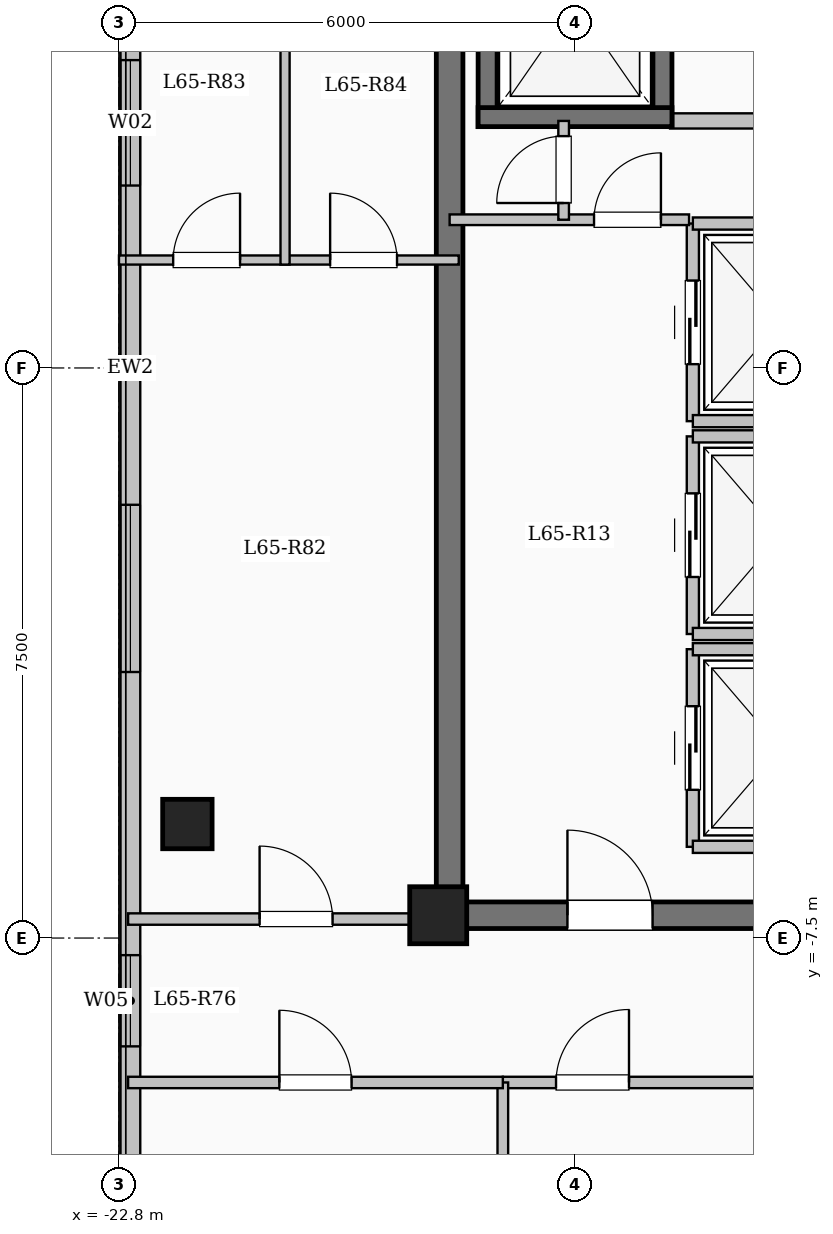
"""IFC4 building model, lengths in metres.
Left out: names, types, materials, properties, quantities, classifications, styles, units other than length and angle.
Written with IfcOpenShell. Run it as: python <this file> out.ifc"""

import sys

from ifc_helpers import new_model, si_unit, direction, frame, frame_2d, origin, origin_2d, place, context, subcontext, project, spatial, rectangle, extrude, element, fill, save


model = new_model("IFC4")
c1 = context("Model", 3, precision=1e-05, world=origin(), true_north=direction((0.0, 1.0)))
c2 = subcontext(c1, "Body", "Model", "MODEL_VIEW")
j1 = project(units=[si_unit("LENGTHUNIT", "METRE"), si_unit("PLANEANGLEUNIT", "RADIAN")], contexts=[c1])
p1 = place(None, origin())
s1 = spatial("IfcSite", under=j1, at=p1, CompositionType="ELEMENT")
p2 = place(p1, origin())
s2 = spatial("IfcBuilding", under=s1, at=p2, CompositionType="ELEMENT")
p3 = place(p2, frame((0.0, 0.0, 241.5)))
s3 = spatial("IfcBuildingStorey", under=s2, at=p3, CompositionType="ELEMENT", Elevation=241.5)
p4 = place(p3, frame((-18.6, -7.2, 0.0), z_axis=(0.0, 0.0, 1.0), x_axis=(1.0, 0.0, 0.0)))
e1 = element("IfcColumn", 1, at=p4, inside=s3, PredefinedType="COLUMN", context=c2, shape_type="SweptSolid", body=[
    extrude(rectangle(XDim=0.75, YDim=0.75, at=origin_2d()), origin(), (0.0, 0.0, 1.0), 3.35),
])
p5 = place(p3, frame((-21.9, -6.0, 0.0), z_axis=(0.0, 0.0, 1.0), x_axis=(1.0, 0.0, 0.0)))
e2 = element("IfcColumn", 2, at=p5, inside=s3, PredefinedType="COLUMN", context=c2, shape_type="SweptSolid", body=[
    extrude(rectangle(XDim=0.65, YDim=0.65, at=origin_2d()), origin(), (0.0, 0.0, 1.0), 3.35),
])
p6 = place(p3, frame((-22.65, -17.55, 0.0), z_axis=(0.0, 0.0, 1.0), x_axis=(0.0, 1.0, 0.0)))
e3 = element("IfcWall", 3, at=p6, inside=s3, PredefinedType="SOLIDWALL", context=c2, shape_type="SweptSolid", body=[
    extrude(rectangle(XDim=35.1, YDim=0.26, at=frame_2d((17.55, 0.0))), origin(), (0.0, 0.0, 1.0), 3.1),
])
p7 = place(p6, frame((2.975, 0.0, 0.9)))
e4 = element("IfcOpeningElement", 4, at=p7, cuts=e3, PredefinedType="OPENING", context=c2, shape_type="SweptSolid", body=[
    extrude(rectangle(XDim=2.2, YDim=1.75, at=frame_2d((1.1, 0.875))), frame((0.0, 0.14, 0.0), z_axis=(0.0, -1.0, 0.0), x_axis=(1.0, 0.0, 0.0)), (0.0, 0.0, 1.0), 0.28),
])
p8 = place(p6, frame((8.625, 0.0, 0.95)))
e5 = element("IfcOpeningElement", 5, at=p8, cuts=e3, PredefinedType="OPENING", context=c2, shape_type="SweptSolid", body=[
    extrude(rectangle(XDim=1.2, YDim=1.5, at=frame_2d((0.6, 0.75))), frame((0.0, 0.14, 0.0), z_axis=(0.0, -1.0, 0.0), x_axis=(1.0, 0.0, 0.0)), (0.0, 0.0, 1.0), 0.28),
])
p9 = place(p6, frame((13.55, 0.0, 0.9)))
e6 = element("IfcOpeningElement", 6, at=p9, cuts=e3, PredefinedType="OPENING", context=c2, shape_type="SweptSolid", body=[
    extrude(rectangle(XDim=2.2, YDim=1.75, at=frame_2d((1.1, 0.875))), frame((0.0, 0.14, 0.0), z_axis=(0.0, -1.0, 0.0), x_axis=(1.0, 0.0, 0.0)), (0.0, 0.0, 1.0), 0.28),
])
p10 = place(p6, frame((19.95, 0.0, 0.9)))
e7 = element("IfcOpeningElement", 7, at=p10, cuts=e3, PredefinedType="OPENING", context=c2, shape_type="SweptSolid", body=[
    extrude(rectangle(XDim=1.65, YDim=1.6, at=frame_2d((0.825, 0.8))), frame((0.0, 0.14, 0.0), z_axis=(0.0, -1.0, 0.0), x_axis=(1.0, 0.0, 0.0)), (0.0, 0.0, 1.0), 0.28),
])
p11 = place(p6, frame((24.425, 0.0, 0.9)))
e8 = element("IfcOpeningElement", 8, at=p11, cuts=e3, PredefinedType="OPENING", context=c2, shape_type="SweptSolid", body=[
    extrude(rectangle(XDim=2.0, YDim=1.7, at=frame_2d((1.0, 0.85))), frame((0.0, 0.14, 0.0), z_axis=(0.0, -1.0, 0.0), x_axis=(1.0, 0.0, 0.0)), (0.0, 0.0, 1.0), 0.28),
])
p12 = place(p6, frame((28.675, 0.0, 0.95)))
e9 = element("IfcOpeningElement", 9, at=p12, cuts=e3, PredefinedType="OPENING", context=c2, shape_type="SweptSolid", body=[
    extrude(rectangle(XDim=1.0, YDim=1.5, at=frame_2d((0.5, 0.75))), frame((0.0, 0.14, 0.0), z_axis=(0.0, -1.0, 0.0), x_axis=(1.0, 0.0, 0.0)), (0.0, 0.0, 1.0), 0.28),
])
p13 = place(p6, frame((31.6, 0.0, 0.9)))
e10 = element("IfcOpeningElement", 10, at=p13, cuts=e3, PredefinedType="OPENING", context=c2, shape_type="SweptSolid", body=[
    extrude(rectangle(XDim=2.0, YDim=1.7, at=frame_2d((1.0, 0.85))), frame((0.0, 0.14, 0.0), z_axis=(0.0, -1.0, 0.0), x_axis=(1.0, 0.0, 0.0)), (0.0, 0.0, 1.0), 0.28),
])
p14 = place(p3, frame((-15.55, 3.25, 0.0), z_axis=(0.0, 0.0, 1.0), x_axis=(1.0, 0.0, 0.0)))
e11 = element("IfcWall", 11, at=p14, inside=s3, PredefinedType="SOLIDWALL", context=c2, shape_type="SweptSolid", body=[
    extrude(rectangle(XDim=5.4, YDim=0.2, at=frame_2d((2.7, 0.0))), origin(), (0.0, 0.0, 1.0), 3.1),
])
p15 = place(p3, frame((-17.95, 3.175, 0.0), z_axis=(0.0, 0.0, 1.0), x_axis=(0.0, 1.0, 0.0)))
e12 = element("IfcWall", 12, at=p15, inside=s3, PredefinedType="SHEAR", context=c2, shape_type="SweptSolid", body=[
    extrude(rectangle(XDim=3.25, YDim=0.25, at=frame_2d((1.625, 0.0))), origin(), (0.0, 0.0, 1.0), 3.35),
])
p16 = place(p3, frame((-15.65, 3.175, 0.0), z_axis=(0.0, 0.0, 1.0), x_axis=(0.0, 1.0, 0.0)))
e13 = element("IfcWall", 13, at=p16, inside=s3, PredefinedType="SHEAR", context=c2, shape_type="SweptSolid", body=[
    extrude(rectangle(XDim=3.25, YDim=0.25, at=frame_2d((1.625, 0.0))), origin(), (0.0, 0.0, 1.0), 3.35),
])
p17 = place(p16, frame((1.075, 0.0, 0.0)))
e14 = element("IfcOpeningElement", 14, at=p17, cuts=e13, PredefinedType="OPENING", context=c2, shape_type="SweptSolid", body=[
    extrude(rectangle(XDim=1.1, YDim=2.15, at=frame_2d((0.55, 1.075))), frame((0.0, 0.135, 0.0), z_axis=(0.0, -1.0, 0.0), x_axis=(1.0, 0.0, 0.0)), (0.0, 0.0, 1.0), 0.27),
])
p18 = place(p3, frame((-18.075, 3.3, 0.0), z_axis=(0.0, 0.0, 1.0), x_axis=(1.0, 0.0, 0.0)))
e15 = element("IfcWall", 15, at=p18, inside=s3, PredefinedType="SHEAR", context=c2, shape_type="SweptSolid", body=[
    extrude(rectangle(XDim=2.55, YDim=0.25, at=frame_2d((1.275, 0.0))), origin(), (0.0, 0.0, 1.0), 3.35),
])
p19 = place(p3, frame((-15.25, -6.3, 0.0), z_axis=(0.0, 0.0, 1.0), x_axis=(0.0, 1.0, 0.0)))
e16 = element("IfcWall", 16, at=p19, inside=s3, PredefinedType="SOLIDWALL", context=c2, shape_type="SweptSolid", body=[
    extrude(rectangle(XDim=2.6, YDim=0.16, at=frame_2d((1.3, 0.0))), origin(), (0.0, 0.0, 1.0), 3.1),
])
p20 = place(p19, frame((0.75, 0.0, 0.0)))
e17 = element("IfcOpeningElement", 17, at=p20, cuts=e16, PredefinedType="OPENING", context=c2, shape_type="SweptSolid", body=[
    extrude(rectangle(XDim=1.1, YDim=2.15, at=frame_2d((0.55, 1.075))), frame((0.0, 0.09, 0.0), z_axis=(0.0, -1.0, 0.0), x_axis=(1.0, 0.0, 0.0)), (0.0, 0.0, 1.0), 0.18),
])
for number, where, z_axis, x_axis in (
    (18, (-15.25, -6.3, 0.0), (0.0, 0.0, 1.0), (1.0, 0.0, 0.0)),
    (19, (-15.25, -3.7, 0.0), (0.0, 0.0, 1.0), (1.0, 0.0, 0.0)),
):
    element("IfcWall", number, at=place(p3, frame(where, z_axis=z_axis, x_axis=x_axis)), inside=s3, PredefinedType="SOLIDWALL", context=c2, shape_type="SweptSolid", body=[
        extrude(rectangle(XDim=2.3, YDim=0.16, at=frame_2d((1.15, 0.0))), origin(), (0.0, 0.0, 1.0), 3.1),
    ])
p21 = place(p3, frame((-15.25, -3.5, 0.0), z_axis=(0.0, 0.0, 1.0), x_axis=(0.0, 1.0, 0.0)))
e20 = element("IfcWall", 20, at=p21, inside=s3, PredefinedType="SOLIDWALL", context=c2, shape_type="SweptSolid", body=[
    extrude(rectangle(XDim=2.6, YDim=0.16, at=frame_2d((1.3, 0.0))), origin(), (0.0, 0.0, 1.0), 3.1),
])
p22 = place(p21, frame((0.75, 0.0, 0.0)))
e21 = element("IfcOpeningElement", 21, at=p22, cuts=e20, PredefinedType="OPENING", context=c2, shape_type="SweptSolid", body=[
    extrude(rectangle(XDim=1.1, YDim=2.15, at=frame_2d((0.55, 1.075))), frame((0.0, 0.09, 0.0), z_axis=(0.0, -1.0, 0.0), x_axis=(1.0, 0.0, 0.0)), (0.0, 0.0, 1.0), 0.18),
])
for number, where, z_axis, x_axis in (
    (22, (-15.25, -3.5, 0.0), (0.0, 0.0, 1.0), (1.0, 0.0, 0.0)),
    (23, (-15.25, -0.9, 0.0), (0.0, 0.0, 1.0), (1.0, 0.0, 0.0)),
):
    element("IfcWall", number, at=place(p3, frame(where, z_axis=z_axis, x_axis=x_axis)), inside=s3, PredefinedType="SOLIDWALL", context=c2, shape_type="SweptSolid", body=[
        extrude(rectangle(XDim=2.3, YDim=0.16, at=frame_2d((1.15, 0.0))), origin(), (0.0, 0.0, 1.0), 3.1),
    ])
p23 = place(p3, frame((-15.25, -0.7, 0.0), z_axis=(0.0, 0.0, 1.0), x_axis=(0.0, 1.0, 0.0)))
e24 = element("IfcWall", 24, at=p23, inside=s3, PredefinedType="SOLIDWALL", context=c2, shape_type="SweptSolid", body=[
    extrude(rectangle(XDim=2.6, YDim=0.16, at=frame_2d((1.3, 0.0))), origin(), (0.0, 0.0, 1.0), 3.1),
])
p24 = place(p23, frame((0.75, 0.0, 0.0)))
e25 = element("IfcOpeningElement", 25, at=p24, cuts=e24, PredefinedType="OPENING", context=c2, shape_type="SweptSolid", body=[
    extrude(rectangle(XDim=1.1, YDim=2.15, at=frame_2d((0.55, 1.075))), frame((0.0, 0.09, 0.0), z_axis=(0.0, -1.0, 0.0), x_axis=(1.0, 0.0, 0.0)), (0.0, 0.0, 1.0), 0.18),
])
for number, where, z_axis, x_axis in (
    (26, (-15.25, -0.7, 0.0), (0.0, 0.0, 1.0), (1.0, 0.0, 0.0)),
    (27, (-15.25, 1.9, 0.0), (0.0, 0.0, 1.0), (1.0, 0.0, 0.0)),
):
    element("IfcWall", number, at=place(p3, frame(where, z_axis=z_axis, x_axis=x_axis)), inside=s3, PredefinedType="SOLIDWALL", context=c2, shape_type="SweptSolid", body=[
        extrude(rectangle(XDim=2.3, YDim=0.16, at=frame_2d((1.15, 0.0))), origin(), (0.0, 0.0, 1.0), 3.1),
    ])
p25 = place(p3, frame((-18.45, -7.375, 0.0), z_axis=(0.0, 0.0, 1.0), x_axis=(0.0, 1.0, 0.0)))
e28 = element("IfcWall", 28, at=p25, inside=s3, PredefinedType="SHEAR", context=c2, shape_type="SweptSolid", body=[
    extrude(rectangle(XDim=14.05, YDim=0.35, at=frame_2d((7.025, 0.0))), origin(), (0.0, 0.0, 1.0), 3.35),
])
p26 = place(p3, frame((-18.625, -7.2, 0.0), z_axis=(0.0, 0.0, 1.0), x_axis=(1.0, 0.0, 0.0)))
e29 = element("IfcWall", 29, at=p26, inside=s3, PredefinedType="SHEAR", context=c2, shape_type="SweptSolid", body=[
    extrude(rectangle(XDim=8.55, YDim=0.35, at=frame_2d((4.275, 0.0))), origin(), (0.0, 0.0, 1.0), 3.35),
])
p27 = place(p26, frame((1.725, 0.0, 0.0)))
e30 = element("IfcOpeningElement", 30, at=p27, cuts=e29, PredefinedType="OPENING", context=c2, shape_type="SweptSolid", body=[
    extrude(rectangle(XDim=1.12, YDim=2.15, at=frame_2d((0.56, 1.075))), frame((0.0, 0.185, 0.0), z_axis=(0.0, -1.0, 0.0), x_axis=(1.0, 0.0, 0.0)), (0.0, 0.0, 1.0), 0.37),
])
p28 = place(p3, frame((-18.45, 1.95, 0.0), z_axis=(0.0, 0.0, 1.0), x_axis=(1.0, 0.0, 0.0)))
e31 = element("IfcWall", 31, at=p28, inside=s3, PredefinedType="PARTITIONING", context=c2, shape_type="SweptSolid", body=[
    extrude(rectangle(XDim=3.15, YDim=0.14, at=frame_2d((1.575, 0.0))), origin(), (0.0, 0.0, 1.0), 3.1),
])
p29 = place(p28, frame((1.9, 0.0, 0.0)))
e32 = element("IfcOpeningElement", 32, at=p29, cuts=e31, PredefinedType="OPENING", context=c2, shape_type="SweptSolid", body=[
    extrude(rectangle(XDim=0.88, YDim=2.1, at=frame_2d((0.44, 1.05))), frame((0.0, 0.08, 0.0), z_axis=(0.0, -1.0, 0.0), x_axis=(1.0, 0.0, 0.0)), (0.0, 0.0, 1.0), 0.16),
])
p30 = place(p3, frame((-16.95, 1.95, 0.0), z_axis=(0.0, 0.0, 1.0), x_axis=(0.0, 1.0, 0.0)))
e33 = element("IfcWall", 33, at=p30, inside=s3, PredefinedType="PARTITIONING", context=c2, shape_type="SweptSolid", body=[
    extrude(rectangle(XDim=1.3, YDim=0.14, at=frame_2d((0.65, 0.0))), origin(), (0.0, 0.0, 1.0), 3.1),
])
p31 = place(p30, frame((0.22, 0.0, 0.0)))
e34 = element("IfcOpeningElement", 34, at=p31, cuts=e33, PredefinedType="OPENING", context=c2, shape_type="SweptSolid", body=[
    extrude(rectangle(XDim=0.88, YDim=2.1, at=frame_2d((0.44, 1.05))), frame((0.0, 0.08, 0.0), z_axis=(0.0, -1.0, 0.0), x_axis=(1.0, 0.0, 0.0)), (0.0, 0.0, 1.0), 0.16),
])
p32 = place(p3, frame((-17.75, -9.4, 0.0), z_axis=(0.0, 0.0, 1.0), x_axis=(1.0, 0.0, 0.0)))
e35 = element("IfcWall", 35, at=p32, inside=s3, PredefinedType="PARTITIONING", context=c2, shape_type="SweptSolid", body=[
    extrude(rectangle(XDim=9.2, YDim=0.15, at=frame_2d((4.6, 0.0))), origin(), (0.0, 0.0, 1.0), 3.1),
])
p33 = place(p32, frame((0.7, 0.0, 0.0)))
e36 = element("IfcOpeningElement", 36, at=p33, cuts=e35, PredefinedType="OPENING", context=c2, shape_type="SweptSolid", body=[
    extrude(rectangle(XDim=0.96, YDim=2.15, at=frame_2d((0.48, 1.075))), frame((0.0, 0.085, 0.0), z_axis=(0.0, -1.0, 0.0), x_axis=(1.0, 0.0, 0.0)), (0.0, 0.0, 1.0), 0.17),
])
p34 = place(p3, frame((-22.68, -7.25, 0.0), z_axis=(0.0, 0.0, 1.0), x_axis=(1.0, 0.0, 0.0)))
e37 = element("IfcWall", 37, at=p34, inside=s3, PredefinedType="PARTITIONING", context=c2, shape_type="SweptSolid", body=[
    extrude(rectangle(XDim=4.23, YDim=0.15, at=frame_2d((2.115, 0.0))), origin(), (0.0, 0.0, 1.0), 3.1),
])
p35 = place(p34, frame((1.73, 0.0, 0.0)))
e38 = element("IfcOpeningElement", 38, at=p35, cuts=e37, PredefinedType="OPENING", context=c2, shape_type="SweptSolid", body=[
    extrude(rectangle(XDim=0.96, YDim=2.15, at=frame_2d((0.48, 1.075))), frame((0.0, 0.085, 0.0), z_axis=(0.0, -1.0, 0.0), x_axis=(1.0, 0.0, 0.0)), (0.0, 0.0, 1.0), 0.17),
])
p36 = place(p3, frame((-17.75, -17.55, 0.0), z_axis=(0.0, 0.0, 1.0), x_axis=(0.0, 1.0, 0.0)))
e39 = element("IfcWall", 39, at=p36, inside=s3, PredefinedType="PARTITIONING", context=c2, shape_type="SweptSolid", body=[
    extrude(rectangle(XDim=8.15, YDim=0.14, at=frame_2d((4.075, 0.0))), origin(), (0.0, 0.0, 1.0), 3.1),
])
p37 = place(p3, frame((-22.68, -9.4, 0.0), z_axis=(0.0, 0.0, 1.0), x_axis=(1.0, 0.0, 0.0)))
e40 = element("IfcWall", 40, at=p37, inside=s3, PredefinedType="PARTITIONING", context=c2, shape_type="SweptSolid", body=[
    extrude(rectangle(XDim=4.93, YDim=0.15, at=frame_2d((2.465, 0.0))), origin(), (0.0, 0.0, 1.0), 3.1),
])
p38 = place(p37, frame((1.99, 0.0, 0.0)))
e41 = element("IfcOpeningElement", 41, at=p38, cuts=e40, PredefinedType="OPENING", context=c2, shape_type="SweptSolid", body=[
    extrude(rectangle(XDim=0.95, YDim=2.15, at=frame_2d((0.475, 1.075))), frame((0.0, 0.085, 0.0), z_axis=(0.0, -1.0, 0.0), x_axis=(1.0, 0.0, 0.0)), (0.0, 0.0, 1.0), 0.17),
])
p39 = place(p3, frame((-22.8, 1.42, 0.0), z_axis=(0.0, 0.0, 1.0), x_axis=(1.0, 0.0, 0.0)))
e42 = element("IfcWall", 42, at=p39, inside=s3, PredefinedType="PARTITIONING", context=c2, shape_type="SweptSolid", body=[
    extrude(rectangle(XDim=4.47, YDim=0.12, at=frame_2d((2.235, 0.0))), origin(), (0.0, 0.0, 1.0), 3.1),
])
p40 = place(p39, frame((0.713, 0.0, 0.0)))
e43 = element("IfcOpeningElement", 43, at=p40, cuts=e42, PredefinedType="OPENING", context=c2, shape_type="SweptSolid", body=[
    extrude(rectangle(XDim=0.88, YDim=2.1, at=frame_2d((0.44, 1.05))), frame((0.0, 0.07, 0.0), z_axis=(0.0, -1.0, 0.0), x_axis=(1.0, 0.0, 0.0)), (0.0, 0.0, 1.0), 0.14),
])
p41 = place(p39, frame((2.778, 0.0, 0.0)))
e44 = element("IfcOpeningElement", 44, at=p41, cuts=e42, PredefinedType="OPENING", context=c2, shape_type="SweptSolid", body=[
    extrude(rectangle(XDim=0.88, YDim=2.1, at=frame_2d((0.44, 1.05))), frame((0.0, 0.07, 0.0), z_axis=(0.0, -1.0, 0.0), x_axis=(1.0, 0.0, 0.0)), (0.0, 0.0, 1.0), 0.14),
])
p42 = place(p3, frame((-20.615, 1.36, 0.0), z_axis=(0.0, 0.0, 1.0), x_axis=(0.0, 1.0, 0.0)))
e45 = element("IfcWall", 45, at=p42, inside=s3, PredefinedType="PARTITIONING", context=c2, shape_type="SweptSolid", body=[
    extrude(rectangle(XDim=3.58, YDim=0.12, at=frame_2d((1.79, 0.0))), origin(), (0.0, 0.0, 1.0), 3.1),
])
p43 = place(p8, origin())
e46 = element("IfcWindow", 46, at=p43, inside=s3, PartitioningType="SINGLE_PANEL", PredefinedType="WINDOW", context=c2, shape_type="SweptSolid", body=[
    extrude(rectangle(XDim=1.2, YDim=1.5, at=frame_2d((0.6, 0.75))), frame((0.0, 0.03, 0.0), z_axis=(0.0, -1.0, 0.0), x_axis=(1.0, 0.0, 0.0)), (0.0, 0.0, 1.0), 0.06),
])
fill(e5, e46)
p44 = place(p9, origin())
e47 = element("IfcWindow", 47, at=p44, inside=s3, PartitioningType="SINGLE_PANEL", PredefinedType="WINDOW", context=c2, shape_type="SweptSolid", body=[
    extrude(rectangle(XDim=2.2, YDim=1.75, at=frame_2d((1.1, 0.875))), frame((0.0, 0.03, 0.0), z_axis=(0.0, -1.0, 0.0), x_axis=(1.0, 0.0, 0.0)), (0.0, 0.0, 1.0), 0.06),
])
fill(e6, e47)
p45 = place(p10, origin())
e48 = element("IfcWindow", 48, at=p45, inside=s3, PartitioningType="SINGLE_PANEL", PredefinedType="WINDOW", context=c2, shape_type="SweptSolid", body=[
    extrude(rectangle(XDim=1.65, YDim=1.6, at=frame_2d((0.825, 0.8))), frame((0.0, 0.03, 0.0), z_axis=(0.0, -1.0, 0.0), x_axis=(1.0, 0.0, 0.0)), (0.0, 0.0, 1.0), 0.06),
])
fill(e7, e48)
p46 = place(p20, origin())
e49 = element("IfcDoor", 49, at=p46, inside=s3, OperationType="SLIDING_TO_LEFT", PredefinedType="DOOR", context=c2, shape_type="SweptSolid", body=[
    extrude(rectangle(XDim=1.1, YDim=2.15, at=frame_2d((0.55, 1.075))), frame((0.0, 0.025, 0.0), z_axis=(0.0, -1.0, 0.0), x_axis=(1.0, 0.0, 0.0)), (0.0, 0.0, 1.0), 0.05),
])
fill(e17, e49)
p47 = place(p22, origin())
e50 = element("IfcDoor", 50, at=p47, inside=s3, OperationType="SLIDING_TO_LEFT", PredefinedType="DOOR", context=c2, shape_type="SweptSolid", body=[
    extrude(rectangle(XDim=1.1, YDim=2.15, at=frame_2d((0.55, 1.075))), frame((0.0, 0.025, 0.0), z_axis=(0.0, -1.0, 0.0), x_axis=(1.0, 0.0, 0.0)), (0.0, 0.0, 1.0), 0.05),
])
fill(e21, e50)
p48 = place(p24, origin())
e51 = element("IfcDoor", 51, at=p48, inside=s3, OperationType="SLIDING_TO_LEFT", PredefinedType="DOOR", context=c2, shape_type="SweptSolid", body=[
    extrude(rectangle(XDim=1.1, YDim=2.15, at=frame_2d((0.55, 1.075))), frame((0.0, 0.025, 0.0), z_axis=(0.0, -1.0, 0.0), x_axis=(1.0, 0.0, 0.0)), (0.0, 0.0, 1.0), 0.05),
])
fill(e25, e51)
p49 = place(p27, origin())
e52 = element("IfcDoor", 52, at=p49, inside=s3, OperationType="SINGLE_SWING_LEFT", PredefinedType="DOOR", context=c2, shape_type="SweptSolid", body=[
    extrude(rectangle(XDim=1.12, YDim=2.15, at=frame_2d((0.56, 1.075))), frame((0.0, 0.025, 0.0), z_axis=(0.0, -1.0, 0.0), x_axis=(1.0, 0.0, 0.0)), (0.0, 0.0, 1.0), 0.05),
])
fill(e30, e52)
p50 = place(p29, origin())
e53 = element("IfcDoor", 53, at=p50, inside=s3, OperationType="SINGLE_SWING_RIGHT", PredefinedType="DOOR", context=c2, shape_type="SweptSolid", body=[
    extrude(rectangle(XDim=0.88, YDim=2.1, at=frame_2d((0.44, 1.05))), frame((0.0, 0.025, 0.0), z_axis=(0.0, -1.0, 0.0), x_axis=(1.0, 0.0, 0.0)), (0.0, 0.0, 1.0), 0.05),
])
fill(e32, e53)
p51 = place(p31, origin())
e54 = element("IfcDoor", 54, at=p51, inside=s3, OperationType="SINGLE_SWING_LEFT", PredefinedType="DOOR", context=c2, shape_type="SweptSolid", body=[
    extrude(rectangle(XDim=0.88, YDim=2.1, at=frame_2d((0.44, 1.05))), frame((0.0, 0.025, 0.0), z_axis=(0.0, -1.0, 0.0), x_axis=(1.0, 0.0, 0.0)), (0.0, 0.0, 1.0), 0.05),
])
fill(e34, e54)
p52 = place(p33, origin())
e55 = element("IfcDoor", 55, at=p52, inside=s3, OperationType="SINGLE_SWING_RIGHT", PredefinedType="DOOR", context=c2, shape_type="SweptSolid", body=[
    extrude(rectangle(XDim=0.96, YDim=2.15, at=frame_2d((0.48, 1.075))), frame((0.0, 0.025, 0.0), z_axis=(0.0, -1.0, 0.0), x_axis=(1.0, 0.0, 0.0)), (0.0, 0.0, 1.0), 0.05),
])
fill(e36, e55)
p53 = place(p38, origin())
e56 = element("IfcDoor", 56, at=p53, inside=s3, OperationType="SINGLE_SWING_LEFT", PredefinedType="DOOR", context=c2, shape_type="SweptSolid", body=[
    extrude(rectangle(XDim=0.95, YDim=2.15, at=frame_2d((0.475, 1.075))), frame((0.0, 0.025, 0.0), z_axis=(0.0, -1.0, 0.0), x_axis=(1.0, 0.0, 0.0)), (0.0, 0.0, 1.0), 0.05),
])
fill(e41, e56)
p54 = place(p35, origin())
e57 = element("IfcDoor", 57, at=p54, inside=s3, OperationType="SINGLE_SWING_LEFT", PredefinedType="DOOR", context=c2, shape_type="SweptSolid", body=[
    extrude(rectangle(XDim=0.96, YDim=2.15, at=frame_2d((0.48, 1.075))), frame((0.0, 0.025, 0.0), z_axis=(0.0, -1.0, 0.0), x_axis=(1.0, 0.0, 0.0)), (0.0, 0.0, 1.0), 0.05),
])
fill(e38, e57)
p55 = place(p40, origin())
e58 = element("IfcDoor", 58, at=p55, inside=s3, OperationType="SINGLE_SWING_RIGHT", PredefinedType="DOOR", context=c2, shape_type="SweptSolid", body=[
    extrude(rectangle(XDim=0.88, YDim=2.1, at=frame_2d((0.44, 1.05))), frame((0.0, 0.025, 0.0), z_axis=(0.0, -1.0, 0.0), x_axis=(1.0, 0.0, 0.0)), (0.0, 0.0, 1.0), 0.05),
])
fill(e43, e58)
p56 = place(p41, origin())
e59 = element("IfcDoor", 59, at=p56, inside=s3, OperationType="SINGLE_SWING_LEFT", PredefinedType="DOOR", context=c2, shape_type="SweptSolid", body=[
    extrude(rectangle(XDim=0.88, YDim=2.1, at=frame_2d((0.44, 1.05))), frame((0.0, 0.025, 0.0), z_axis=(0.0, -1.0, 0.0), x_axis=(1.0, 0.0, 0.0)), (0.0, 0.0, 1.0), 0.05),
])
fill(e44, e59)
save(model, sys.argv[1])
